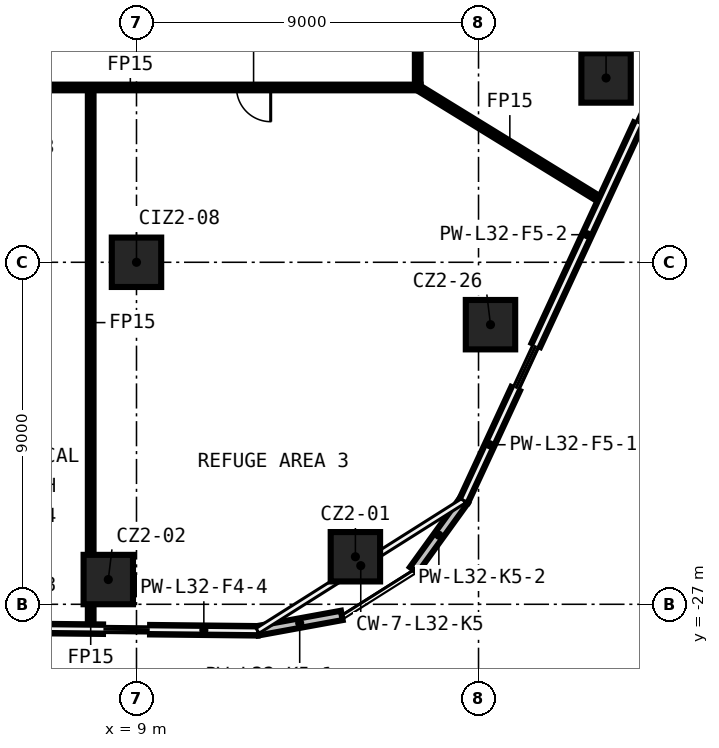
"""IFC4 building model, lengths in metres.
Left out: names, types, materials, properties, quantities, classifications, styles, units other than length and angle.
Written with IfcOpenShell. Run it as: python <this file> out.ifc"""

import sys

from ifc_helpers import new_model, si_unit, direction, frame, frame_2d, origin, origin_2d, place, context, subcontext, project, spatial, rectangle, extrude, element, fill, save


model = new_model("IFC4")
c1 = context("Model", 3, precision=1e-05, world=origin(), true_north=direction((0.0, 1.0)))
c2 = subcontext(c1, "Body", "Model", "MODEL_VIEW")
j1 = project(units=[si_unit("LENGTHUNIT", "METRE"), si_unit("PLANEANGLEUNIT", "RADIAN")], contexts=[c1])
p1 = place(None, origin())
s1 = spatial("IfcSite", under=j1, at=p1, CompositionType="ELEMENT")
p2 = place(p1, origin())
s2 = spatial("IfcBuilding", under=s1, at=p2, CompositionType="ELEMENT")
p3 = place(p2, frame((0.0, 0.0, 145.6)))
s3 = spatial("IfcBuildingStorey", under=s2, at=p3, CompositionType="ELEMENT", Elevation=145.6)
for number, where, z_axis, x_axis in (
    (1, (14.76, -25.749, 0.0), (0.0, 0.0, 1.0), (1.0, 0.0, 0.0)),
    (2, (8.258, -26.349, 0.0), (0.0, 0.0, 1.0), (1.0, 0.0, 0.0)),
    (3, (21.356, -13.15, 0.0), (0.0, 0.0, 1.0), (1.0, 0.0, 0.0)),
    (4, (18.315, -19.642, 0.0), (0.0, 0.0, 1.0), (1.0, 0.0, 0.0)),
    (5, (9.0, -18.0, 0.0), (0.0, 0.0, 1.0), (1.0, 0.0, 0.0)),
):
    element("IfcColumn", number, at=place(p3, frame(where, z_axis=z_axis, x_axis=x_axis)), inside=s3, PredefinedType="COLUMN", context=c2, shape_type="SweptSolid", body=[
        extrude(rectangle(XDim=1.3, YDim=1.3, at=origin_2d()), origin(), (0.0, 0.0, 1.0), 5.55),
    ])
p4 = place(p3, frame((16.475, -13.4, 0.0), z_axis=(0.0, 0.0, 1.0), x_axis=(-1.0, 0.0, 0.0)))
e6 = element("IfcWall", 6, at=p4, inside=s3, PredefinedType="PARTITIONING", context=c2, shape_type="SweptSolid", body=[
    extrude(rectangle(XDim=32.95, YDim=0.15, at=frame_2d((16.475, 0.0))), origin(), (0.0, 0.0, 1.0), 5.55),
])
p5 = place(p4, frame((29.678, 0.0, 0.0)))
e7 = element("IfcOpeningElement", 7, at=p5, cuts=e6, PredefinedType="OPENING", context=c2, shape_type="SweptSolid", body=[
    extrude(rectangle(XDim=0.9, YDim=2.1, at=frame_2d((0.45, 1.05))), frame((0.0, 0.085, 0.0), z_axis=(0.0, -1.0, 0.0), x_axis=(1.0, 0.0, 0.0)), (0.0, 0.0, 1.0), 0.17),
])
p6 = place(p4, frame((23.632, 0.0, 0.0)))
e8 = element("IfcOpeningElement", 8, at=p6, cuts=e6, PredefinedType="OPENING", context=c2, shape_type="SweptSolid", body=[
    extrude(rectangle(XDim=0.9, YDim=2.1, at=frame_2d((0.45, 1.05))), frame((0.0, 0.085, 0.0), z_axis=(0.0, -1.0, 0.0), x_axis=(1.0, 0.0, 0.0)), (0.0, 0.0, 1.0), 0.17),
])
p7 = place(p4, frame((19.232, 0.0, 0.0)))
e9 = element("IfcOpeningElement", 9, at=p7, cuts=e6, PredefinedType="OPENING", context=c2, shape_type="SweptSolid", body=[
    extrude(rectangle(XDim=0.9, YDim=2.1, at=frame_2d((0.45, 1.05))), frame((0.0, 0.085, 0.0), z_axis=(0.0, -1.0, 0.0), x_axis=(1.0, 0.0, 0.0)), (0.0, 0.0, 1.0), 0.17),
])
p8 = place(p4, frame((14.831, 0.0, 0.0)))
e10 = element("IfcOpeningElement", 10, at=p8, cuts=e6, PredefinedType="OPENING", context=c2, shape_type="SweptSolid", body=[
    extrude(rectangle(XDim=0.9, YDim=2.1, at=frame_2d((0.45, 1.05))), frame((0.0, 0.085, 0.0), z_axis=(0.0, -1.0, 0.0), x_axis=(1.0, 0.0, 0.0)), (0.0, 0.0, 1.0), 0.17),
])
p9 = place(p4, frame((10.43, 0.0, 0.0)))
e11 = element("IfcOpeningElement", 11, at=p9, cuts=e6, PredefinedType="OPENING", context=c2, shape_type="SweptSolid", body=[
    extrude(rectangle(XDim=0.9, YDim=2.1, at=frame_2d((0.45, 1.05))), frame((0.0, 0.085, 0.0), z_axis=(0.0, -1.0, 0.0), x_axis=(1.0, 0.0, 0.0)), (0.0, 0.0, 1.0), 0.17),
])
p10 = place(p4, frame((3.944, 0.0, 0.0)))
e12 = element("IfcOpeningElement", 12, at=p10, cuts=e6, PredefinedType="OPENING", context=c2, shape_type="SweptSolid", body=[
    extrude(rectangle(XDim=0.9, YDim=2.1, at=frame_2d((0.45, 1.05))), frame((0.0, 0.085, 0.0), z_axis=(0.0, -1.0, 0.0), x_axis=(1.0, 0.0, 0.0)), (0.0, 0.0, 1.0), 0.17),
])
p11 = place(p3, frame((16.4, 13.325, 0.0), z_axis=(0.0, 0.0, 1.0), x_axis=(0.0, -1.0, 0.0)))
e13 = element("IfcWall", 13, at=p11, inside=s3, PredefinedType="PARTITIONING", context=c2, shape_type="SweptSolid", body=[
    extrude(rectangle(XDim=26.65, YDim=0.15, at=frame_2d((13.325, 0.0))), origin(), (0.0, 0.0, 1.0), 5.55),
])
p12 = place(p11, frame((24.616, 0.0, 0.0)))
e14 = element("IfcOpeningElement", 14, at=p12, cuts=e13, PredefinedType="OPENING", context=c2, shape_type="SweptSolid", body=[
    extrude(rectangle(XDim=0.9, YDim=2.1, at=frame_2d((0.45, 1.05))), frame((0.0, 0.085, 0.0), z_axis=(0.0, -1.0, 0.0), x_axis=(1.0, 0.0, 0.0)), (0.0, 0.0, 1.0), 0.17),
])
p13 = place(p11, frame((17.503, 0.0, 0.0)))
e15 = element("IfcOpeningElement", 15, at=p13, cuts=e13, PredefinedType="OPENING", context=c2, shape_type="SweptSolid", body=[
    extrude(rectangle(XDim=0.9, YDim=2.1, at=frame_2d((0.45, 1.05))), frame((0.0, 0.085, 0.0), z_axis=(0.0, -1.0, 0.0), x_axis=(1.0, 0.0, 0.0)), (0.0, 0.0, 1.0), 0.17),
])
p14 = place(p11, frame((10.472, 0.0, 0.0)))
e16 = element("IfcOpeningElement", 16, at=p14, cuts=e13, PredefinedType="OPENING", context=c2, shape_type="SweptSolid", body=[
    extrude(rectangle(XDim=0.9, YDim=2.1, at=frame_2d((0.45, 1.05))), frame((0.0, 0.085, 0.0), z_axis=(0.0, -1.0, 0.0), x_axis=(1.0, 0.0, 0.0)), (0.0, 0.0, 1.0), 0.17),
])
p15 = place(p11, frame((6.104, 0.0, 0.0)))
e17 = element("IfcOpeningElement", 17, at=p15, cuts=e13, PredefinedType="OPENING", context=c2, shape_type="SweptSolid", body=[
    extrude(rectangle(XDim=0.9, YDim=2.1, at=frame_2d((0.45, 1.05))), frame((0.0, 0.085, 0.0), z_axis=(0.0, -1.0, 0.0), x_axis=(1.0, 0.0, 0.0)), (0.0, 0.0, 1.0), 0.17),
])
p16 = place(p11, frame((1.438, 0.0, 0.0)))
e18 = element("IfcOpeningElement", 18, at=p16, cuts=e13, PredefinedType="OPENING", context=c2, shape_type="SweptSolid", body=[
    extrude(rectangle(XDim=0.9, YDim=2.1, at=frame_2d((0.45, 1.05))), frame((0.0, 0.085, 0.0), z_axis=(0.0, -1.0, 0.0), x_axis=(1.0, 0.0, 0.0)), (0.0, 0.0, 1.0), 0.17),
])
p17 = place(p3, frame((7.795, -27.632, 0.0), z_axis=(0.0, 0.0, 1.0), x_axis=(0.0, 1.0, 0.0)))
e19 = element("IfcWall", 19, at=p17, inside=s3, PredefinedType="PARTITIONING", context=c2, shape_type="SweptSolid", body=[
    extrude(rectangle(XDim=0.633, YDim=0.15, at=frame_2d((0.316, 0.0))), origin(), (0.0, 0.0, 1.0), 5.55),
])
p18 = place(p3, frame((7.795, -25.699, 0.0), z_axis=(0.0, 0.0, 1.0), x_axis=(0.0, 1.0, 0.0)))
e20 = element("IfcWall", 20, at=p18, inside=s3, PredefinedType="PARTITIONING", context=c2, shape_type="SweptSolid", body=[
    extrude(rectangle(XDim=12.224, YDim=0.15, at=frame_2d((6.112, 0.0))), origin(), (0.0, 0.0, 1.0), 5.55),
])
p19 = place(p3, frame((16.4, -13.4, 0.0), z_axis=(0.0, 0.0, 1.0), x_axis=(0.851901274015, -0.523702414861, 0.0)))
e21 = element("IfcWall", 21, at=p19, inside=s3, PredefinedType="PARTITIONING", context=c2, shape_type="SweptSolid", body=[
    extrude(rectangle(XDim=5.691, YDim=0.15, at=frame_2d((2.845, 0.0))), origin(), (0.0, 0.0, 1.0), 5.55),
])
p20 = place(p3, frame((2.288, -27.595, 0.0), z_axis=(0.0, 0.0, 1.0), x_axis=(0.999945660058, -0.010424822867, 0.0)))
e22 = element("IfcWall", 22, at=p20, inside=s3, PredefinedType="SOLIDWALL", context=c2, shape_type="SweptSolid", body=[
    extrude(rectangle(XDim=5.831, YDim=0.25, at=frame_2d((2.916, 0.0))), origin(), (0.0, 0.0, 1.0), 5.55),
])
p21 = place(p3, frame((9.357, -27.668, 0.0), z_axis=(0.0, 0.0, 1.0), x_axis=(0.99994549789, -0.010440366317, 0.0)))
e23 = element("IfcWall", 23, at=p21, inside=s3, PredefinedType="SOLIDWALL", context=c2, shape_type="SweptSolid", body=[
    extrude(rectangle(XDim=2.83, YDim=0.25, at=frame_2d((1.415, 0.0))), origin(), (0.0, 0.0, 1.0), 5.55),
])
for number, where, z_axis, x_axis in (
    (24, (12.187, -27.698, 0.0), (0.0, 0.0, 1.0), (0.984, 0.18, 0.0)),
    (25, (16.298, -26.095, 0.0), (0.0, 0.0, 1.0), (0.585, 0.811, 0.0)),
):
    element("IfcWall", number, at=place(p3, frame(where, z_axis=z_axis, x_axis=x_axis)), inside=s3, PredefinedType="SOLIDWALL", context=c2, shape_type="SweptSolid", body=[
        extrude(rectangle(XDim=2.252, YDim=0.25, at=frame_2d((1.126, 0.0))), origin(), (0.0, 0.0, 1.0), 5.55),
    ])
p22 = place(p3, frame((17.615, -24.269, 0.0), z_axis=(0.0, 0.0, 1.0), x_axis=(0.420401941699, 0.907337978603, 0.0)))
e26 = element("IfcWall", 26, at=p22, inside=s3, PredefinedType="SOLIDWALL", context=c2, shape_type="SweptSolid", body=[
    extrude(rectangle(XDim=3.236, YDim=0.25, at=frame_2d((1.618, 0.0))), origin(), (0.0, 0.0, 1.0), 5.55),
])
p23 = place(p3, frame((19.511, -20.178, 0.0), z_axis=(0.0, 0.0, 1.0), x_axis=(0.420327741059, 0.907372354712, 0.0)))
e27 = element("IfcWall", 27, at=p23, inside=s3, PredefinedType="SOLIDWALL", context=c2, shape_type="SweptSolid", body=[
    extrude(rectangle(XDim=6.4, YDim=0.25, at=frame_2d((3.2, 0.0))), origin(), (0.0, 0.0, 1.0), 5.55),
])
p24 = place(p10, origin())
e28 = element("IfcDoor", 28, at=p24, inside=s3, OperationType="SINGLE_SWING_RIGHT", PredefinedType="DOOR", context=c2, shape_type="SweptSolid", body=[
    extrude(rectangle(XDim=0.9, YDim=2.1, at=frame_2d((0.45, 1.05))), frame((0.0, 0.025, 0.0), z_axis=(0.0, -1.0, 0.0), x_axis=(1.0, 0.0, 0.0)), (0.0, 0.0, 1.0), 0.05),
])
fill(e12, e28)
save(model, sys.argv[1])
